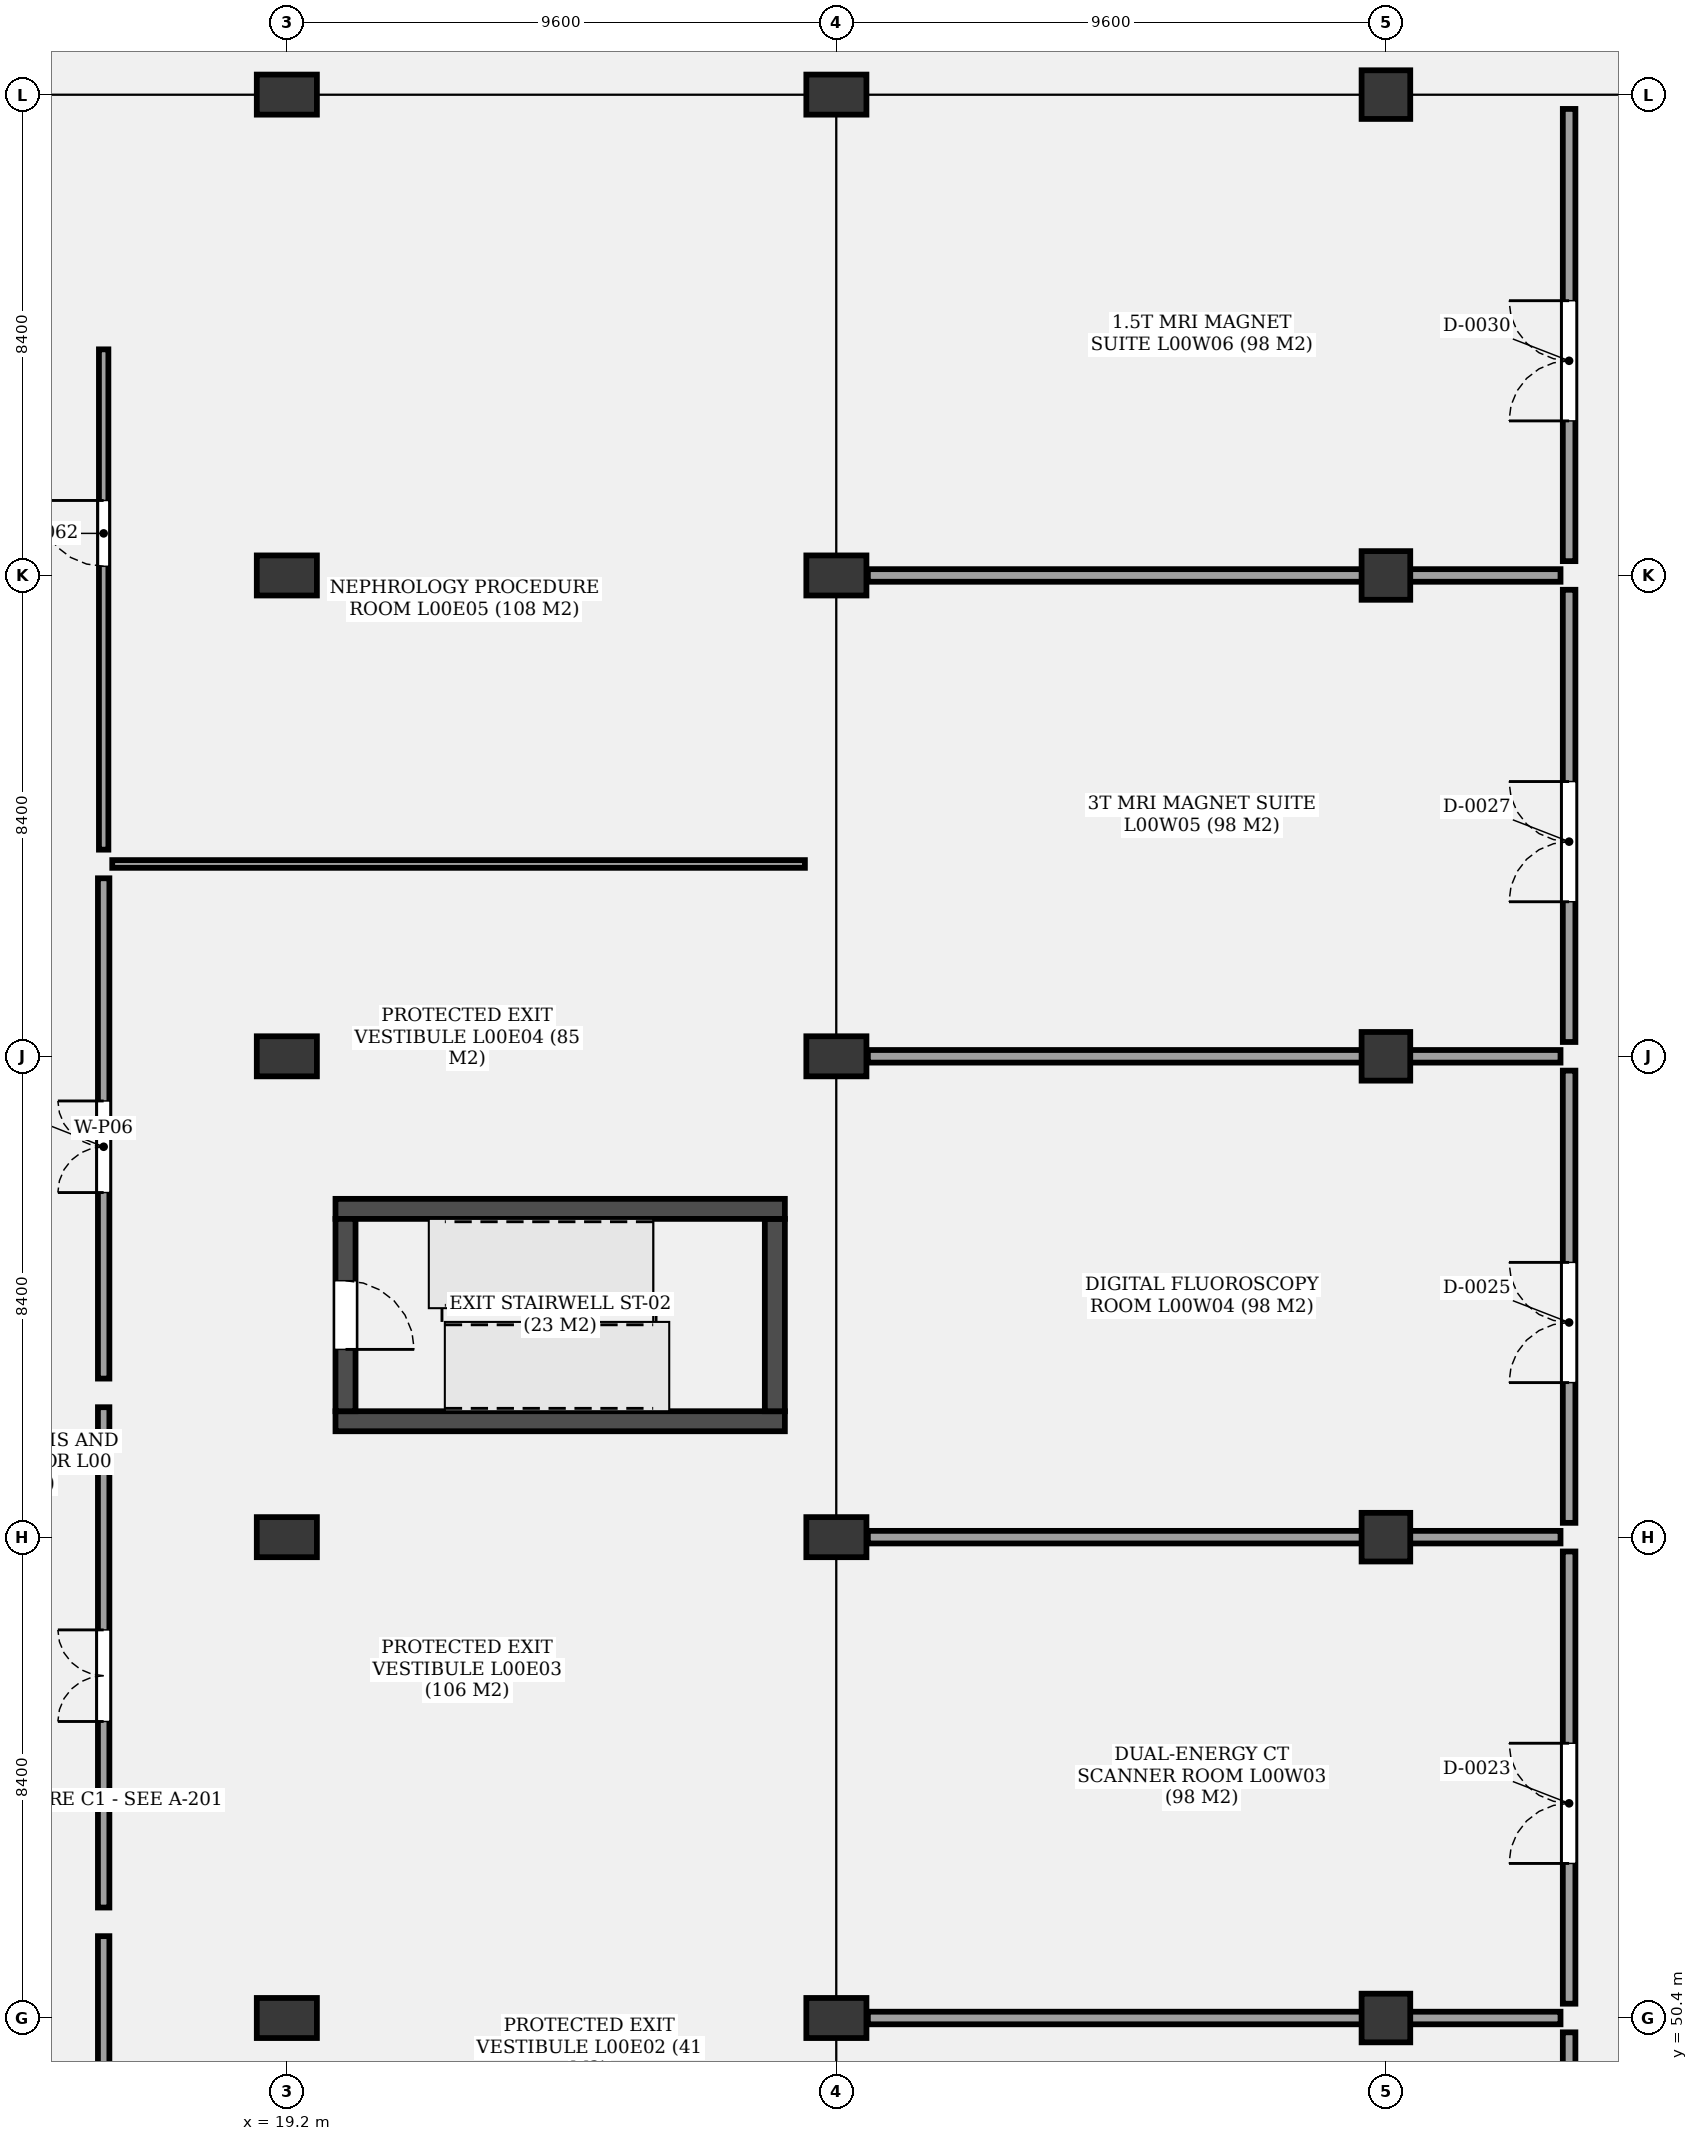
"""IFC4 building model, lengths in metres.
Left out: names, types, materials, properties, quantities, classifications, styles, units other than length and angle.
Written with IfcOpenShell. Run it as: python <this file> out.ifc"""

import sys

from ifc_helpers import new_model, si_unit, direction, frame, frame_2d, origin, origin_2d, place, context, subcontext, project, spatial, rectangle, extrude, element, fill, save


model = new_model("IFC4")
c1 = context("Model", 3, precision=1e-05, world=origin(), true_north=direction((0.0, 1.0)))
c2 = subcontext(c1, "Body", "Model", "MODEL_VIEW")
j1 = project(units=[si_unit("LENGTHUNIT", "METRE"), si_unit("PLANEANGLEUNIT", "RADIAN")], contexts=[c1])
p1 = place(None, origin())
s1 = spatial("IfcSite", under=j1, at=p1, CompositionType="ELEMENT")
p2 = place(p1, origin())
s2 = spatial("IfcBuilding", under=s1, at=p2, CompositionType="ELEMENT")
p3 = place(p2, origin())
s3 = spatial("IfcBuildingStorey", under=s2, at=p3, CompositionType="ELEMENT", Elevation=0.0)
for number, where, z_axis, x_axis in (
    (1, (19.2, 50.4, -0.35), (0.0, 0.0, 1.0), (1.0, 0.0, 0.0)),
    (2, (19.2, 58.8, -0.35), (0.0, 0.0, 1.0), (1.0, 0.0, 0.0)),
    (3, (19.2, 67.2, -0.35), (0.0, 0.0, 1.0), (1.0, 0.0, 0.0)),
    (4, (19.2, 75.6, -0.35), (0.0, 0.0, 1.0), (1.0, 0.0, 0.0)),
    (5, (19.2, 84.0, -0.35), (0.0, 0.0, 1.0), (1.0, 0.0, 0.0)),
    (6, (28.8, 50.4, -0.35), (0.0, 0.0, 1.0), (1.0, 0.0, 0.0)),
    (7, (28.8, 58.8, -0.35), (0.0, 0.0, 1.0), (1.0, 0.0, 0.0)),
    (8, (28.8, 67.2, -0.35), (0.0, 0.0, 1.0), (1.0, 0.0, 0.0)),
    (9, (28.8, 75.6, -0.35), (0.0, 0.0, 1.0), (1.0, 0.0, 0.0)),
    (10, (28.8, 84.0, -0.35), (0.0, 0.0, 1.0), (1.0, 0.0, 0.0)),
):
    element("IfcColumn", number, at=place(p3, frame(where, z_axis=z_axis, x_axis=x_axis)), inside=s3, PredefinedType="COLUMN", context=c2, shape_type="SweptSolid", body=[
        extrude(rectangle(XDim=1.05, YDim=0.7, at=origin_2d()), origin(), (0.0, 0.0, 1.0), 5.45),
    ])
for number, where, z_axis, x_axis in (
    (11, (38.4, 50.4, -0.35), (0.0, 0.0, 1.0), (1.0, 0.0, 0.0)),
    (12, (38.4, 58.8, -0.35), (0.0, 0.0, 1.0), (1.0, 0.0, 0.0)),
    (13, (38.4, 67.2, -0.35), (0.0, 0.0, 1.0), (1.0, 0.0, 0.0)),
    (14, (38.4, 75.6, -0.35), (0.0, 0.0, 1.0), (1.0, 0.0, 0.0)),
    (15, (38.4, 84.0, -0.35), (0.0, 0.0, 1.0), (1.0, 0.0, 0.0)),
):
    element("IfcColumn", number, at=place(p3, frame(where, z_axis=z_axis, x_axis=x_axis)), inside=s3, PredefinedType="COLUMN", context=c2, shape_type="SweptSolid", body=[
        extrude(rectangle(XDim=0.85, YDim=0.85, at=origin_2d()), origin(), (0.0, 0.0, 1.0), 5.45),
    ])
p4 = place(p3, frame((20.05, 60.825, 0.0), z_axis=(0.0, 0.0, 1.0), x_axis=(1.0, 0.0, 0.0)))
e16 = element("IfcWall", 16, at=p4, inside=s3, PredefinedType="SHEAR", context=c2, shape_type="SweptSolid", body=[
    extrude(rectangle(XDim=7.85, YDim=0.35, at=frame_2d((3.925, 0.0))), origin(), (0.0, 0.0, 1.0), 5.1),
])
p5 = place(p3, frame((27.725, 61.0, 0.0), z_axis=(0.0, 0.0, 1.0), x_axis=(0.0, 1.0, 0.0)))
e17 = element("IfcWall", 17, at=p5, inside=s3, PredefinedType="SHEAR", context=c2, shape_type="SweptSolid", body=[
    extrude(rectangle(XDim=3.36, YDim=0.35, at=frame_2d((1.68, 0.0))), origin(), (0.0, 0.0, 1.0), 5.1),
])
p6 = place(p3, frame((27.9, 64.535, 0.0), z_axis=(0.0, 0.0, 1.0), x_axis=(-1.0, 0.0, 0.0)))
e18 = element("IfcWall", 18, at=p6, inside=s3, PredefinedType="SHEAR", context=c2, shape_type="SweptSolid", body=[
    extrude(rectangle(XDim=7.85, YDim=0.35, at=frame_2d((3.925, 0.0))), origin(), (0.0, 0.0, 1.0), 5.1),
])
p7 = place(p3, frame((20.225, 64.36, 0.0), z_axis=(0.0, 0.0, 1.0), x_axis=(0.0, -1.0, 0.0)))
e19 = element("IfcWall", 19, at=p7, inside=s3, PredefinedType="SHEAR", context=c2, shape_type="SweptSolid", body=[
    extrude(rectangle(XDim=3.36, YDim=0.35, at=frame_2d((1.68, 0.0))), origin(), (0.0, 0.0, 1.0), 5.1),
])
p8 = place(p7, frame((1.08, 0.0, 0.0)))
e20 = element("IfcOpeningElement", 20, at=p8, cuts=e19, PredefinedType="OPENING", context=c2, shape_type="SweptSolid", body=[
    extrude(rectangle(XDim=1.2, YDim=2.2, at=frame_2d((0.6, 1.1))), frame((0.0, 0.185, 0.0), z_axis=(0.0, -1.0, 0.0), x_axis=(1.0, 0.0, 0.0)), (0.0, 0.0, 1.0), 0.37),
])
p9 = place(p3, frame((41.6, 42.25, 0.0), z_axis=(0.0, 0.0, 1.0), x_axis=(0.0, 1.0, 0.0)))
e21 = element("IfcWall", 21, at=p9, inside=s3, PredefinedType="PARTITIONING", context=c2, shape_type="SweptSolid", body=[
    extrude(rectangle(XDim=7.9, YDim=0.22, at=frame_2d((3.95, 0.0))), origin(), (0.0, 0.0, 1.0), 3.98),
])
p10 = place(p9, frame((2.45, 0.0, 0.0)))
e22 = element("IfcOpeningElement", 22, at=p10, cuts=e21, PredefinedType="OPENING", context=c2, shape_type="SweptSolid", body=[
    extrude(rectangle(XDim=2.1, YDim=2.4, at=frame_2d((1.05, 1.2))), frame((0.0, 0.12, 0.0), z_axis=(0.0, -1.0, 0.0), x_axis=(1.0, 0.0, 0.0)), (0.0, 0.0, 1.0), 0.24),
])
p11 = place(p3, frame((41.6, 50.65, 0.0), z_axis=(0.0, 0.0, 1.0), x_axis=(0.0, 1.0, 0.0)))
e23 = element("IfcWall", 23, at=p11, inside=s3, PredefinedType="PARTITIONING", context=c2, shape_type="SweptSolid", body=[
    extrude(rectangle(XDim=7.9, YDim=0.22, at=frame_2d((3.95, 0.0))), origin(), (0.0, 0.0, 1.0), 3.98),
])
p12 = place(p11, frame((2.45, 0.0, 0.0)))
e24 = element("IfcOpeningElement", 24, at=p12, cuts=e23, PredefinedType="OPENING", context=c2, shape_type="SweptSolid", body=[
    extrude(rectangle(XDim=2.1, YDim=2.4, at=frame_2d((1.05, 1.2))), frame((0.0, 0.12, 0.0), z_axis=(0.0, -1.0, 0.0), x_axis=(1.0, 0.0, 0.0)), (0.0, 0.0, 1.0), 0.24),
])
p13 = place(p3, frame((29.35, 50.4, 0.0), z_axis=(0.0, 0.0, 1.0), x_axis=(1.0, 0.0, 0.0)))
e25 = element("IfcWall", 25, at=p13, inside=s3, PredefinedType="PARTITIONING", context=c2, shape_type="SweptSolid", body=[
    extrude(rectangle(XDim=12.1, YDim=0.22, at=frame_2d((6.05, 0.0))), origin(), (0.0, 0.0, 1.0), 3.98),
])
p14 = place(p3, frame((41.6, 59.05, 0.0), z_axis=(0.0, 0.0, 1.0), x_axis=(0.0, 1.0, 0.0)))
e26 = element("IfcWall", 26, at=p14, inside=s3, PredefinedType="PARTITIONING", context=c2, shape_type="SweptSolid", body=[
    extrude(rectangle(XDim=7.9, YDim=0.22, at=frame_2d((3.95, 0.0))), origin(), (0.0, 0.0, 1.0), 3.98),
])
p15 = place(p14, frame((2.45, 0.0, 0.0)))
e27 = element("IfcOpeningElement", 27, at=p15, cuts=e26, PredefinedType="OPENING", context=c2, shape_type="SweptSolid", body=[
    extrude(rectangle(XDim=2.1, YDim=2.4, at=frame_2d((1.05, 1.2))), frame((0.0, 0.12, 0.0), z_axis=(0.0, -1.0, 0.0), x_axis=(1.0, 0.0, 0.0)), (0.0, 0.0, 1.0), 0.24),
])
p16 = place(p3, frame((29.35, 58.8, 0.0), z_axis=(0.0, 0.0, 1.0), x_axis=(1.0, 0.0, 0.0)))
e28 = element("IfcWall", 28, at=p16, inside=s3, PredefinedType="PARTITIONING", context=c2, shape_type="SweptSolid", body=[
    extrude(rectangle(XDim=12.1, YDim=0.22, at=frame_2d((6.05, 0.0))), origin(), (0.0, 0.0, 1.0), 3.98),
])
p17 = place(p3, frame((41.6, 67.45, 0.0), z_axis=(0.0, 0.0, 1.0), x_axis=(0.0, 1.0, 0.0)))
e29 = element("IfcWall", 29, at=p17, inside=s3, PredefinedType="PARTITIONING", context=c2, shape_type="SweptSolid", body=[
    extrude(rectangle(XDim=7.9, YDim=0.22, at=frame_2d((3.95, 0.0))), origin(), (0.0, 0.0, 1.0), 3.98),
])
p18 = place(p17, frame((2.45, 0.0, 0.0)))
e30 = element("IfcOpeningElement", 30, at=p18, cuts=e29, PredefinedType="OPENING", context=c2, shape_type="SweptSolid", body=[
    extrude(rectangle(XDim=2.1, YDim=2.4, at=frame_2d((1.05, 1.2))), frame((0.0, 0.12, 0.0), z_axis=(0.0, -1.0, 0.0), x_axis=(1.0, 0.0, 0.0)), (0.0, 0.0, 1.0), 0.24),
])
p19 = place(p3, frame((29.35, 67.2, 0.0), z_axis=(0.0, 0.0, 1.0), x_axis=(1.0, 0.0, 0.0)))
e31 = element("IfcWall", 31, at=p19, inside=s3, PredefinedType="PARTITIONING", context=c2, shape_type="SweptSolid", body=[
    extrude(rectangle(XDim=12.1, YDim=0.22, at=frame_2d((6.05, 0.0))), origin(), (0.0, 0.0, 1.0), 3.98),
])
p20 = place(p3, frame((41.6, 75.85, 0.0), z_axis=(0.0, 0.0, 1.0), x_axis=(0.0, 1.0, 0.0)))
e32 = element("IfcWall", 32, at=p20, inside=s3, PredefinedType="PARTITIONING", context=c2, shape_type="SweptSolid", body=[
    extrude(rectangle(XDim=7.9, YDim=0.22, at=frame_2d((3.95, 0.0))), origin(), (0.0, 0.0, 1.0), 3.98),
])
p21 = place(p20, frame((2.45, 0.0, 0.0)))
e33 = element("IfcOpeningElement", 33, at=p21, cuts=e32, PredefinedType="OPENING", context=c2, shape_type="SweptSolid", body=[
    extrude(rectangle(XDim=2.1, YDim=2.4, at=frame_2d((1.05, 1.2))), frame((0.0, 0.12, 0.0), z_axis=(0.0, -1.0, 0.0), x_axis=(1.0, 0.0, 0.0)), (0.0, 0.0, 1.0), 0.24),
])
p22 = place(p3, frame((29.35, 75.6, 0.0), z_axis=(0.0, 0.0, 1.0), x_axis=(1.0, 0.0, 0.0)))
e34 = element("IfcWall", 34, at=p22, inside=s3, PredefinedType="PARTITIONING", context=c2, shape_type="SweptSolid", body=[
    extrude(rectangle(XDim=12.1, YDim=0.22, at=frame_2d((6.05, 0.0))), origin(), (0.0, 0.0, 1.0), 3.98),
])
p23 = place(p3, frame((16.0, 43.09, 0.0), z_axis=(0.0, 0.0, 1.0), x_axis=(0.0, 1.0, 0.0)))
e35 = element("IfcWall", 35, at=p23, inside=s3, PredefinedType="PARTITIONING", context=c2, shape_type="SweptSolid", body=[
    extrude(rectangle(XDim=8.74, YDim=0.2, at=frame_2d((4.37, 0.0))), origin(), (0.0, 0.0, 1.0), 3.98),
])
p24 = place(p23, frame((3.25, 0.0, 0.0)))
e36 = element("IfcOpeningElement", 36, at=p24, cuts=e35, PredefinedType="OPENING", context=c2, shape_type="SweptSolid", body=[
    extrude(rectangle(XDim=1.6, YDim=2.2, at=frame_2d((0.8, 1.1))), frame((0.0, 0.11, 0.0), z_axis=(0.0, -1.0, 0.0), x_axis=(1.0, 0.0, 0.0)), (0.0, 0.0, 1.0), 0.22),
])
p25 = place(p3, frame((16.0, 52.33, 0.0), z_axis=(0.0, 0.0, 1.0), x_axis=(0.0, 1.0, 0.0)))
e37 = element("IfcWall", 37, at=p25, inside=s3, PredefinedType="PARTITIONING", context=c2, shape_type="SweptSolid", body=[
    extrude(rectangle(XDim=8.74, YDim=0.2, at=frame_2d((4.37, 0.0))), origin(), (0.0, 0.0, 1.0), 3.98),
])
p26 = place(p25, frame((3.25, 0.0, 0.0)))
e38 = element("IfcOpeningElement", 38, at=p26, cuts=e37, PredefinedType="OPENING", context=c2, shape_type="SweptSolid", body=[
    extrude(rectangle(XDim=1.6, YDim=2.2, at=frame_2d((0.8, 1.1))), frame((0.0, 0.11, 0.0), z_axis=(0.0, -1.0, 0.0), x_axis=(1.0, 0.0, 0.0)), (0.0, 0.0, 1.0), 0.22),
])
p27 = place(p3, frame((16.0, 61.57, 0.0), z_axis=(0.0, 0.0, 1.0), x_axis=(0.0, 1.0, 0.0)))
e39 = element("IfcWall", 39, at=p27, inside=s3, PredefinedType="PARTITIONING", context=c2, shape_type="SweptSolid", body=[
    extrude(rectangle(XDim=8.74, YDim=0.2, at=frame_2d((4.37, 0.0))), origin(), (0.0, 0.0, 1.0), 3.98),
])
p28 = place(p27, frame((3.25, 0.0, 0.0)))
e40 = element("IfcOpeningElement", 40, at=p28, cuts=e39, PredefinedType="OPENING", context=c2, shape_type="SweptSolid", body=[
    extrude(rectangle(XDim=1.6, YDim=2.2, at=frame_2d((0.8, 1.1))), frame((0.0, 0.11, 0.0), z_axis=(0.0, -1.0, 0.0), x_axis=(1.0, 0.0, 0.0)), (0.0, 0.0, 1.0), 0.22),
])
p29 = place(p3, frame((16.0, 70.81, 0.0), z_axis=(0.0, 0.0, 1.0), x_axis=(0.0, 1.0, 0.0)))
e41 = element("IfcWall", 41, at=p29, inside=s3, PredefinedType="PARTITIONING", context=c2, shape_type="SweptSolid", body=[
    extrude(rectangle(XDim=8.74, YDim=0.165, at=frame_2d((4.37, 0.0))), origin(), (0.0, 0.0, 1.0), 3.98),
])
p30 = place(p29, frame((4.95, 0.0, 0.0)))
e42 = element("IfcOpeningElement", 42, at=p30, cuts=e41, PredefinedType="OPENING", context=c2, shape_type="SweptSolid", body=[
    extrude(rectangle(XDim=1.15, YDim=2.2, at=frame_2d((0.575, 1.1))), frame((0.0, 0.093, 0.0), z_axis=(0.0, -1.0, 0.0), x_axis=(1.0, 0.0, 0.0)), (0.0, 0.0, 1.0), 0.185),
])
p31 = place(p3, frame((16.15, 70.56, 0.0), z_axis=(0.0, 0.0, 1.0), x_axis=(1.0, 0.0, 0.0)))
e43 = element("IfcWall", 43, at=p31, inside=s3, PredefinedType="PARTITIONING", context=c2, shape_type="SweptSolid", body=[
    extrude(rectangle(XDim=12.1, YDim=0.135, at=frame_2d((6.05, 0.0))), origin(), (0.0, 0.0, 1.0), 3.98),
])
p32 = place(p8, origin())
e44 = element("IfcDoor", 44, at=p32, inside=s3, OperationType="SINGLE_SWING_RIGHT", PredefinedType="DOOR", context=c2, shape_type="SweptSolid", body=[
    extrude(rectangle(XDim=1.2, YDim=2.2, at=frame_2d((0.6, 1.1))), frame((0.0, 0.025, 0.0), z_axis=(0.0, -1.0, 0.0), x_axis=(1.0, 0.0, 0.0)), (0.0, 0.0, 1.0), 0.05),
])
fill(e20, e44)
p33 = place(p12, origin())
e45 = element("IfcDoor", 45, at=p33, inside=s3, OperationType="DOUBLE_DOOR_SINGLE_SWING", PredefinedType="DOOR", context=c2, shape_type="SweptSolid", body=[
    extrude(rectangle(XDim=2.1, YDim=2.4, at=frame_2d((1.05, 1.2))), frame((0.0, 0.025, 0.0), z_axis=(0.0, -1.0, 0.0), x_axis=(1.0, 0.0, 0.0)), (0.0, 0.0, 1.0), 0.05),
])
fill(e24, e45)
p34 = place(p15, origin())
e46 = element("IfcDoor", 46, at=p34, inside=s3, OperationType="DOUBLE_DOOR_SINGLE_SWING", PredefinedType="DOOR", context=c2, shape_type="SweptSolid", body=[
    extrude(rectangle(XDim=2.1, YDim=2.4, at=frame_2d((1.05, 1.2))), frame((0.0, 0.025, 0.0), z_axis=(0.0, -1.0, 0.0), x_axis=(1.0, 0.0, 0.0)), (0.0, 0.0, 1.0), 0.05),
])
fill(e27, e46)
p35 = place(p18, origin())
e47 = element("IfcDoor", 47, at=p35, inside=s3, OperationType="DOUBLE_DOOR_SINGLE_SWING", PredefinedType="DOOR", context=c2, shape_type="SweptSolid", body=[
    extrude(rectangle(XDim=2.1, YDim=2.4, at=frame_2d((1.05, 1.2))), frame((0.0, 0.025, 0.0), z_axis=(0.0, -1.0, 0.0), x_axis=(1.0, 0.0, 0.0)), (0.0, 0.0, 1.0), 0.05),
])
fill(e30, e47)
p36 = place(p21, origin())
e48 = element("IfcDoor", 48, at=p36, inside=s3, OperationType="DOUBLE_DOOR_SINGLE_SWING", PredefinedType="DOOR", context=c2, shape_type="SweptSolid", body=[
    extrude(rectangle(XDim=2.1, YDim=2.4, at=frame_2d((1.05, 1.2))), frame((0.0, 0.025, 0.0), z_axis=(0.0, -1.0, 0.0), x_axis=(1.0, 0.0, 0.0)), (0.0, 0.0, 1.0), 0.05),
])
fill(e33, e48)
p37 = place(p26, origin())
e49 = element("IfcDoor", 49, at=p37, inside=s3, OperationType="DOUBLE_DOOR_SINGLE_SWING", PredefinedType="DOOR", context=c2, shape_type="SweptSolid", body=[
    extrude(rectangle(XDim=1.6, YDim=2.2, at=frame_2d((0.8, 1.1))), frame((0.0, 0.025, 0.0), z_axis=(0.0, -1.0, 0.0), x_axis=(1.0, 0.0, 0.0)), (0.0, 0.0, 1.0), 0.05),
])
fill(e38, e49)
p38 = place(p28, origin())
e50 = element("IfcDoor", 50, at=p38, inside=s3, OperationType="DOUBLE_DOOR_SINGLE_SWING", PredefinedType="DOOR", context=c2, shape_type="SweptSolid", body=[
    extrude(rectangle(XDim=1.6, YDim=2.2, at=frame_2d((0.8, 1.1))), frame((0.0, 0.025, 0.0), z_axis=(0.0, -1.0, 0.0), x_axis=(1.0, 0.0, 0.0)), (0.0, 0.0, 1.0), 0.05),
])
fill(e40, e50)
p39 = place(p30, origin())
e51 = element("IfcDoor", 51, at=p39, inside=s3, OperationType="SINGLE_SWING_RIGHT", PredefinedType="DOOR", context=c2, shape_type="SweptSolid", body=[
    extrude(rectangle(XDim=1.15, YDim=2.2, at=frame_2d((0.575, 1.1))), frame((0.0, 0.025, 0.0), z_axis=(0.0, -1.0, 0.0), x_axis=(1.0, 0.0, 0.0)), (0.0, 0.0, 1.0), 0.05),
])
fill(e42, e51)
save(model, sys.argv[1])
